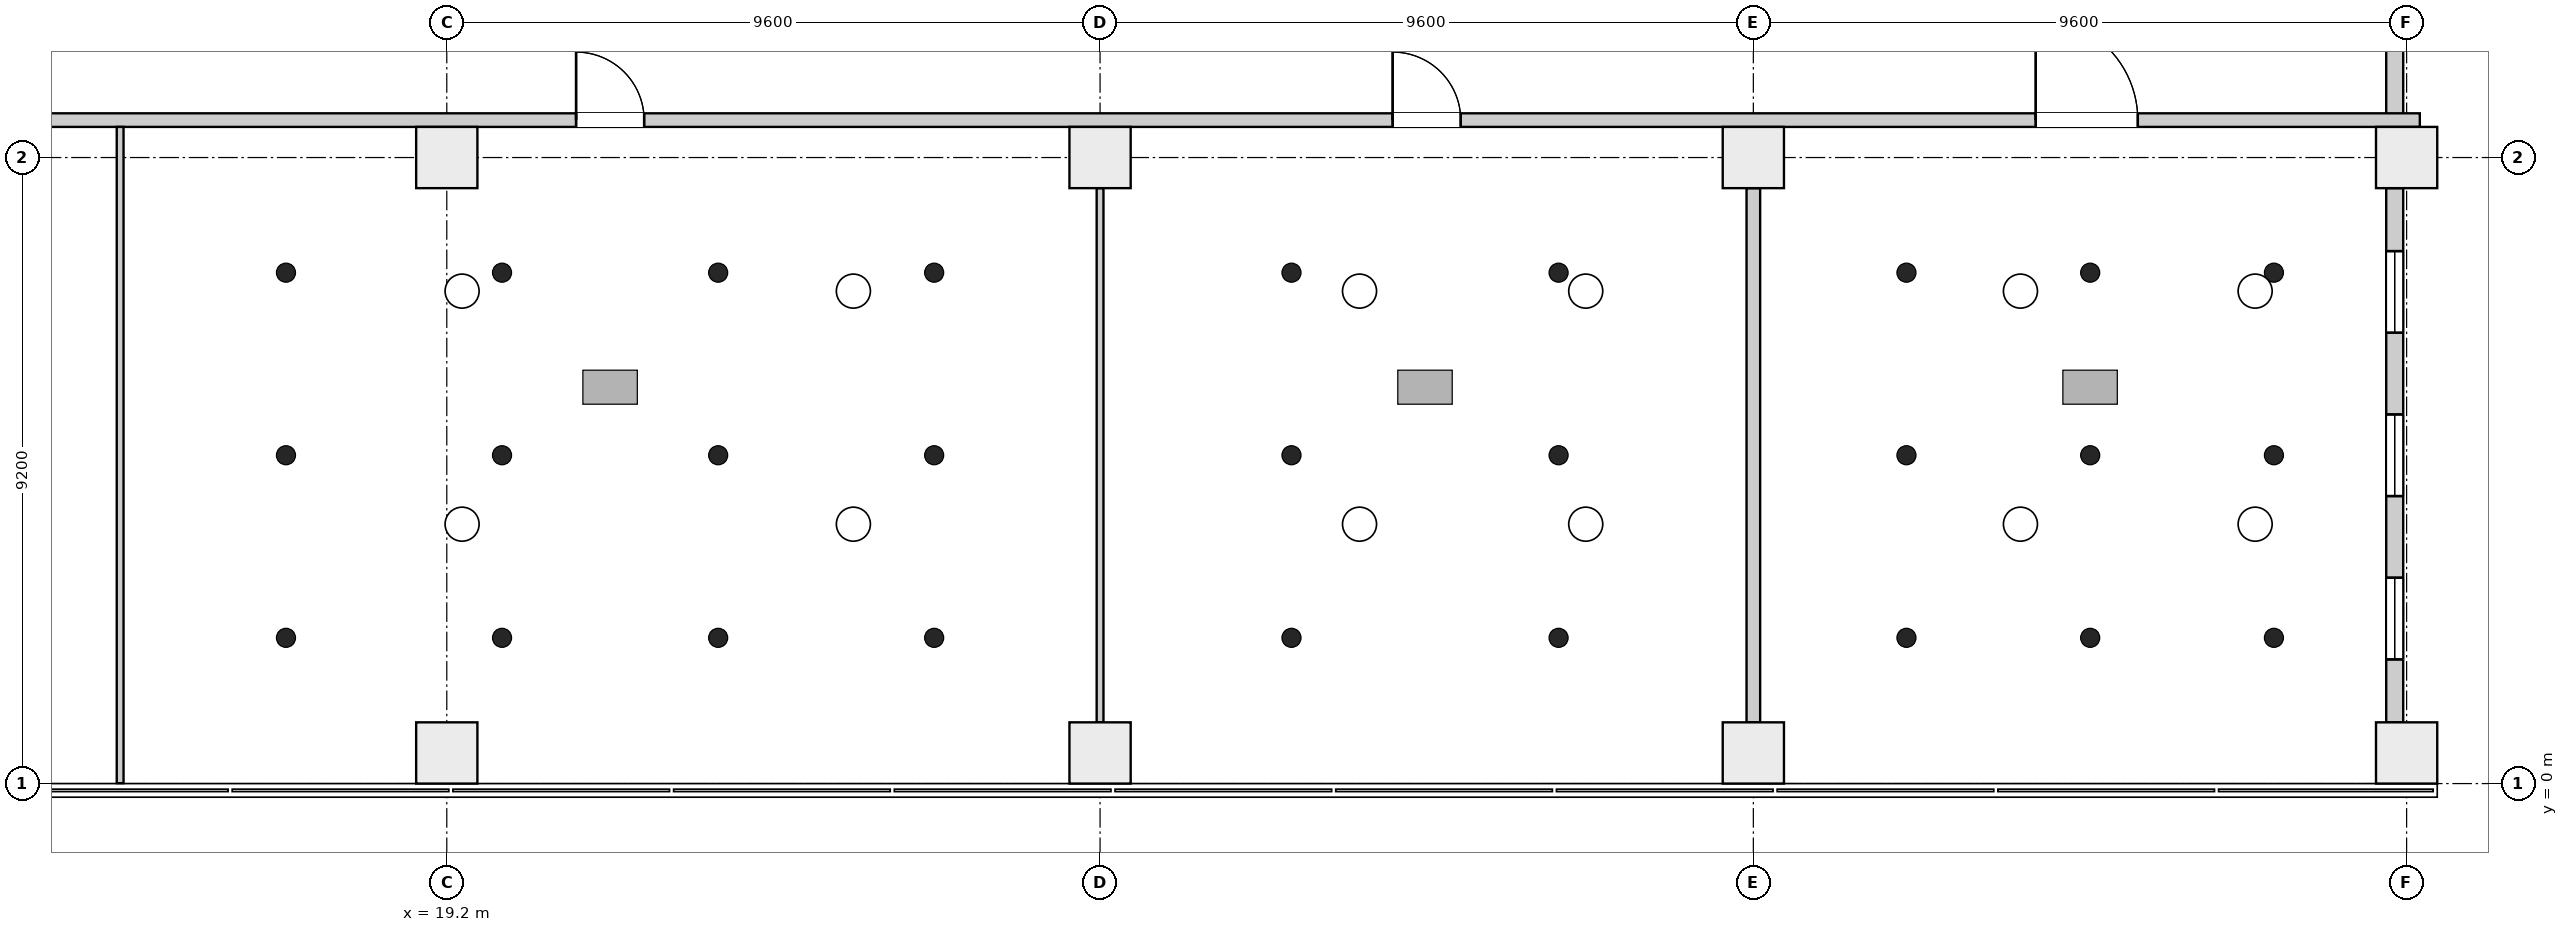
"""IFC4 building model, lengths in metres.
Left out: names, types, materials, properties, quantities, classifications, styles, units other than length and angle.
Written with IfcOpenShell. Run it as: python <this file> out.ifc"""

import sys

from ifc_helpers import new_model, si_unit, direction, frame, frame_2d, origin, origin_2d, place, context, subcontext, project, spatial, rectangle, extrude, element, fill, save


model = new_model("IFC4")
c1 = context("Model", 3, precision=1e-05, world=origin(), true_north=direction((0.0, 1.0)))
c2 = subcontext(c1, "Body", "Model", "MODEL_VIEW")
j1 = project(units=[si_unit("LENGTHUNIT", "METRE"), si_unit("PLANEANGLEUNIT", "RADIAN")], contexts=[c1])
p1 = place(None, origin())
s1 = spatial("IfcSite", under=j1, at=p1, CompositionType="ELEMENT")
p2 = place(p1, origin())
s2 = spatial("IfcBuilding", under=s1, at=p2, CompositionType="ELEMENT")
p3 = place(p2, frame((0.0, 0.0, 52.9)))
s3 = spatial("IfcBuildingStorey", under=s2, at=p3, CompositionType="ELEMENT", Elevation=52.9)
for number, where, z_axis, x_axis in (
    (1, (19.2, 0.45, 0.0), (0.0, 0.0, 1.0), (1.0, 0.0, 0.0)),
    (2, (28.8, 0.45, 0.0), (0.0, 0.0, 1.0), (1.0, 0.0, 0.0)),
    (3, (38.4, 0.45, 0.0), (0.0, 0.0, 1.0), (1.0, 0.0, 0.0)),
    (4, (48.0, 0.45, 0.0), (0.0, 0.0, 1.0), (1.0, 0.0, 0.0)),
    (5, (19.2, 9.2, 0.0), (0.0, 0.0, 1.0), (1.0, 0.0, 0.0)),
    (6, (28.8, 9.2, 0.0), (0.0, 0.0, 1.0), (1.0, 0.0, 0.0)),
    (7, (38.4, 9.2, 0.0), (0.0, 0.0, 1.0), (1.0, 0.0, 0.0)),
    (8, (48.0, 9.2, 0.0), (0.0, 0.0, 1.0), (1.0, 0.0, 0.0)),
):
    element("IfcColumn", number, at=place(p3, frame(where, z_axis=z_axis, x_axis=x_axis)), inside=s3, PredefinedType="COLUMN", context=c2, shape_type="SweptSolid", body=[
        extrude(rectangle(XDim=0.9, YDim=0.9, at=origin_2d()), origin(), (0.0, 0.0, 1.0), 4.2),
    ])
p4 = place(p3, frame((47.825, 0.9, 0.0), z_axis=(0.0, 0.0, 1.0), x_axis=(0.0, 1.0, 0.0)))
e9 = element("IfcWall", 9, at=p4, inside=s3, PredefinedType="ELEMENTEDWALL", context=c2, shape_type="SweptSolid", body=[
    extrude(rectangle(XDim=7.85, YDim=0.25, at=frame_2d((3.925, 0.0))), origin(), (0.0, 0.0, 1.0), 3.3),
])
p5 = place(p4, frame((0.925, 0.0, 0.6)))
e10 = element("IfcOpeningElement", 10, at=p5, cuts=e9, PredefinedType="OPENING", context=c2, shape_type="SweptSolid", body=[
    extrude(rectangle(XDim=1.2, YDim=2.6, at=frame_2d((0.6, 1.3))), frame((0.0, 0.135, 0.0), z_axis=(0.0, -1.0, 0.0), x_axis=(1.0, 0.0, 0.0)), (0.0, 0.0, 1.0), 0.27),
])
p6 = place(p4, frame((3.325, 0.0, 0.6)))
e11 = element("IfcOpeningElement", 11, at=p6, cuts=e9, PredefinedType="OPENING", context=c2, shape_type="SweptSolid", body=[
    extrude(rectangle(XDim=1.2, YDim=2.6, at=frame_2d((0.6, 1.3))), frame((0.0, 0.135, 0.0), z_axis=(0.0, -1.0, 0.0), x_axis=(1.0, 0.0, 0.0)), (0.0, 0.0, 1.0), 0.27),
])
p7 = place(p4, frame((5.725, 0.0, 0.6)))
e12 = element("IfcOpeningElement", 12, at=p7, cuts=e9, PredefinedType="OPENING", context=c2, shape_type="SweptSolid", body=[
    extrude(rectangle(XDim=1.2, YDim=2.6, at=frame_2d((0.6, 1.3))), frame((0.0, 0.135, 0.0), z_axis=(0.0, -1.0, 0.0), x_axis=(1.0, 0.0, 0.0)), (0.0, 0.0, 1.0), 0.27),
])
p8 = place(p3, frame((47.825, 9.65, 0.0), z_axis=(0.0, 0.0, 1.0), x_axis=(0.0, 1.0, 0.0)))
e13 = element("IfcWall", 13, at=p8, inside=s3, PredefinedType="ELEMENTEDWALL", context=c2, shape_type="SweptSolid", body=[
    extrude(rectangle(XDim=8.3, YDim=0.25, at=frame_2d((4.15, 0.0))), origin(), (0.0, 0.0, 1.0), 3.3),
])
p9 = place(p8, frame((1.15, 0.0, 0.6)))
e14 = element("IfcOpeningElement", 14, at=p9, cuts=e13, PredefinedType="OPENING", context=c2, shape_type="SweptSolid", body=[
    extrude(rectangle(XDim=1.2, YDim=2.6, at=frame_2d((0.6, 1.3))), frame((0.0, 0.135, 0.0), z_axis=(0.0, -1.0, 0.0), x_axis=(1.0, 0.0, 0.0)), (0.0, 0.0, 1.0), 0.27),
])
p10 = place(p8, frame((3.55, 0.0, 0.6)))
e15 = element("IfcOpeningElement", 15, at=p10, cuts=e13, PredefinedType="OPENING", context=c2, shape_type="SweptSolid", body=[
    extrude(rectangle(XDim=1.2, YDim=2.6, at=frame_2d((0.6, 1.3))), frame((0.0, 0.135, 0.0), z_axis=(0.0, -1.0, 0.0), x_axis=(1.0, 0.0, 0.0)), (0.0, 0.0, 1.0), 0.27),
])
p11 = place(p8, frame((5.95, 0.0, 0.6)))
e16 = element("IfcOpeningElement", 16, at=p11, cuts=e13, PredefinedType="OPENING", context=c2, shape_type="SweptSolid", body=[
    extrude(rectangle(XDim=1.2, YDim=2.6, at=frame_2d((0.6, 1.3))), frame((0.0, 0.135, 0.0), z_axis=(0.0, -1.0, 0.0), x_axis=(1.0, 0.0, 0.0)), (0.0, 0.0, 1.0), 0.27),
])
p12 = place(p3, frame((4.3, 9.75, 0.0), z_axis=(0.0, 0.0, 1.0), x_axis=(1.0, 0.0, 0.0)))
e17 = element("IfcWall", 17, at=p12, inside=s3, PredefinedType="PARTITIONING", context=c2, shape_type="SweptSolid", body=[
    extrude(rectangle(XDim=43.894, YDim=0.2, at=frame_2d((21.947, 0.0))), origin(), (0.0, 0.0, 1.0), 3.9),
])
p13 = place(p12, frame((2.2, 0.0, 0.0)))
e18 = element("IfcOpeningElement", 18, at=p13, cuts=e17, PredefinedType="OPENING", context=c2, shape_type="SweptSolid", body=[
    extrude(rectangle(XDim=1.0, YDim=2.1, at=frame_2d((0.5, 1.05))), frame((0.0, 0.11, 0.0), z_axis=(0.0, -1.0, 0.0), x_axis=(1.0, 0.0, 0.0)), (0.0, 0.0, 1.0), 0.22),
])
p14 = place(p12, frame((7.2, 0.0, 0.0)))
e19 = element("IfcOpeningElement", 19, at=p14, cuts=e17, PredefinedType="OPENING", context=c2, shape_type="SweptSolid", body=[
    extrude(rectangle(XDim=1.0, YDim=2.1, at=frame_2d((0.5, 1.05))), frame((0.0, 0.11, 0.0), z_axis=(0.0, -1.0, 0.0), x_axis=(1.0, 0.0, 0.0)), (0.0, 0.0, 1.0), 0.22),
])
p15 = place(p12, frame((16.8, 0.0, 0.0)))
e20 = element("IfcOpeningElement", 20, at=p15, cuts=e17, PredefinedType="OPENING", context=c2, shape_type="SweptSolid", body=[
    extrude(rectangle(XDim=1.0, YDim=2.1, at=frame_2d((0.5, 1.05))), frame((0.0, 0.11, 0.0), z_axis=(0.0, -1.0, 0.0), x_axis=(1.0, 0.0, 0.0)), (0.0, 0.0, 1.0), 0.22),
])
p16 = place(p12, frame((28.8, 0.0, 0.0)))
e21 = element("IfcOpeningElement", 21, at=p16, cuts=e17, PredefinedType="OPENING", context=c2, shape_type="SweptSolid", body=[
    extrude(rectangle(XDim=1.0, YDim=2.1, at=frame_2d((0.5, 1.05))), frame((0.0, 0.11, 0.0), z_axis=(0.0, -1.0, 0.0), x_axis=(1.0, 0.0, 0.0)), (0.0, 0.0, 1.0), 0.22),
])
p17 = place(p12, frame((38.25, 0.0, 0.0)))
e22 = element("IfcOpeningElement", 22, at=p17, cuts=e17, PredefinedType="OPENING", context=c2, shape_type="SweptSolid", body=[
    extrude(rectangle(XDim=1.5, YDim=2.1, at=frame_2d((0.75, 1.05))), frame((0.0, 0.11, 0.0), z_axis=(0.0, -1.0, 0.0), x_axis=(1.0, 0.0, 0.0)), (0.0, 0.0, 1.0), 0.22),
])
p18 = place(p3, frame((14.4, 0.006, 0.0), z_axis=(0.0, 0.0, 1.0), x_axis=(0.0, 1.0, 0.0)))
e23 = element("IfcWall", 23, at=p18, inside=s3, PredefinedType="PARTITIONING", context=c2, shape_type="SweptSolid", body=[
    extrude(rectangle(XDim=9.644, YDim=0.1, at=frame_2d((4.822, 0.0))), origin(), (0.0, 0.0, 1.0), 3.9),
])
p19 = place(p3, frame((28.8, 0.9, 0.0), z_axis=(0.0, 0.0, 1.0), x_axis=(0.0, 1.0, 0.0)))
e24 = element("IfcWall", 24, at=p19, inside=s3, PredefinedType="PARTITIONING", context=c2, shape_type="SweptSolid", body=[
    extrude(rectangle(XDim=7.85, YDim=0.1, at=frame_2d((3.925, 0.0))), origin(), (0.0, 0.0, 1.0), 3.9),
])
p20 = place(p3, frame((38.4, 0.9, 0.0), z_axis=(0.0, 0.0, 1.0), x_axis=(0.0, 1.0, 0.0)))
e25 = element("IfcWall", 25, at=p20, inside=s3, PredefinedType="PARTITIONING", context=c2, shape_type="SweptSolid", body=[
    extrude(rectangle(XDim=7.85, YDim=0.2, at=frame_2d((3.925, 0.0))), origin(), (0.0, 0.0, 1.0), 3.9),
])
p21 = place(p5, origin())
e26 = element("IfcWindow", 26, at=p21, inside=s3, PartitioningType="SINGLE_PANEL", PredefinedType="WINDOW", context=c2, shape_type="SweptSolid", body=[
    extrude(rectangle(XDim=1.2, YDim=2.6, at=frame_2d((0.6, 1.3))), frame((0.0, 0.03, 0.0), z_axis=(0.0, -1.0, 0.0), x_axis=(1.0, 0.0, 0.0)), (0.0, 0.0, 1.0), 0.06),
])
fill(e10, e26)
p22 = place(p6, origin())
e27 = element("IfcWindow", 27, at=p22, inside=s3, PartitioningType="SINGLE_PANEL", PredefinedType="WINDOW", context=c2, shape_type="SweptSolid", body=[
    extrude(rectangle(XDim=1.2, YDim=2.6, at=frame_2d((0.6, 1.3))), frame((0.0, 0.03, 0.0), z_axis=(0.0, -1.0, 0.0), x_axis=(1.0, 0.0, 0.0)), (0.0, 0.0, 1.0), 0.06),
])
fill(e11, e27)
p23 = place(p7, origin())
e28 = element("IfcWindow", 28, at=p23, inside=s3, PartitioningType="SINGLE_PANEL", PredefinedType="WINDOW", context=c2, shape_type="SweptSolid", body=[
    extrude(rectangle(XDim=1.2, YDim=2.6, at=frame_2d((0.6, 1.3))), frame((0.0, 0.03, 0.0), z_axis=(0.0, -1.0, 0.0), x_axis=(1.0, 0.0, 0.0)), (0.0, 0.0, 1.0), 0.06),
])
fill(e12, e28)
p24 = place(p15, origin())
e29 = element("IfcDoor", 29, at=p24, inside=s3, OperationType="SINGLE_SWING_RIGHT", PredefinedType="DOOR", context=c2, shape_type="SweptSolid", body=[
    extrude(rectangle(XDim=1.0, YDim=2.1, at=frame_2d((0.5, 1.05))), frame((0.0, 0.025, 0.0), z_axis=(0.0, -1.0, 0.0), x_axis=(1.0, 0.0, 0.0)), (0.0, 0.0, 1.0), 0.05),
])
fill(e20, e29)
p25 = place(p16, origin())
e30 = element("IfcDoor", 30, at=p25, inside=s3, OperationType="SINGLE_SWING_RIGHT", PredefinedType="DOOR", context=c2, shape_type="SweptSolid", body=[
    extrude(rectangle(XDim=1.0, YDim=2.1, at=frame_2d((0.5, 1.05))), frame((0.0, 0.025, 0.0), z_axis=(0.0, -1.0, 0.0), x_axis=(1.0, 0.0, 0.0)), (0.0, 0.0, 1.0), 0.05),
])
fill(e21, e30)
p26 = place(p17, origin())
e31 = element("IfcDoor", 31, at=p26, inside=s3, OperationType="DOUBLE_DOOR_SINGLE_SWING", PredefinedType="DOOR", context=c2, shape_type="SweptSolid", body=[
    extrude(rectangle(XDim=1.5, YDim=2.1, at=frame_2d((0.75, 1.05))), frame((0.0, 0.025, 0.0), z_axis=(0.0, -1.0, 0.0), x_axis=(1.0, 0.0, 0.0)), (0.0, 0.0, 1.0), 0.05),
])
fill(e22, e31)
save(model, sys.argv[1])
